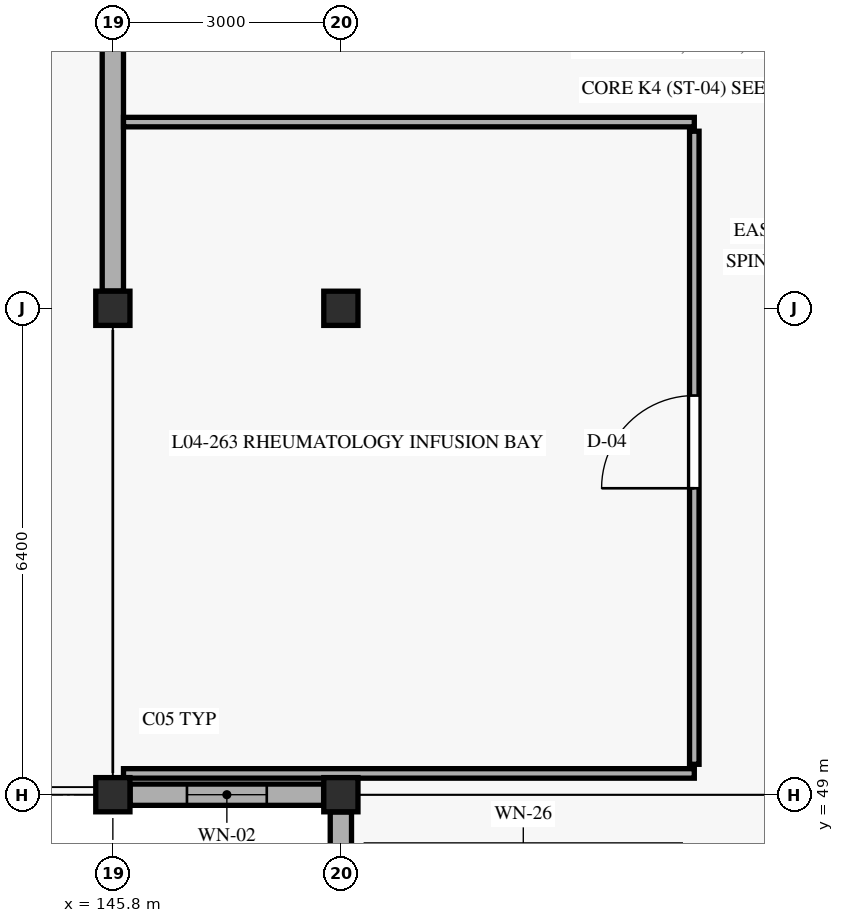
"""IFC4 building model, lengths in metres.
Left out: names, types, materials, properties, quantities, classifications, styles, units other than length and angle.
Written with IfcOpenShell. Run it as: python <this file> out.ifc"""

import sys

from ifc_helpers import new_model, si_unit, direction, frame, frame_2d, origin, origin_with_axes, origin_2d, place, context, subcontext, project, spatial, rectangle, extrude, element, fill, save


model = new_model("IFC4")
c1 = context("Model", 3, precision=1e-05, world=origin(), true_north=direction((0.0, 1.0)))
c2 = subcontext(c1, "Body", "Model", "MODEL_VIEW")
j1 = project(units=[si_unit("LENGTHUNIT", "METRE"), si_unit("PLANEANGLEUNIT", "RADIAN")], contexts=[c1])
p1 = place(None, origin())
s1 = spatial("IfcSite", under=j1, at=p1, CompositionType="ELEMENT")
p2 = place(p1, origin())
s2 = spatial("IfcBuilding", under=s1, at=p2, CompositionType="ELEMENT")
p3 = place(p2, frame((0.0, 0.0, 13.5)))
s3 = spatial("IfcBuildingStorey", under=s2, at=p3, CompositionType="ELEMENT", Elevation=13.5)
for number, where, z_axis, x_axis in (
    (1, (145.8, 49.0, 0.0), (0.0, 0.0, 1.0), (1.0, 0.0, 0.0)),
    (2, (145.8, 55.4, 0.0), (0.0, 0.0, 1.0), (1.0, 0.0, 0.0)),
    (3, (148.8, 49.0, 0.0), (0.0, 0.0, 1.0), (1.0, 0.0, 0.0)),
    (4, (148.8, 55.4, 0.0), (0.0, 0.0, 1.0), (1.0, 0.0, 0.0)),
):
    element("IfcColumn", number, at=place(p3, frame(where, z_axis=z_axis, x_axis=x_axis)), inside=s3, PredefinedType="COLUMN", context=c2, shape_type="SweptSolid", body=[
        extrude(rectangle(XDim=0.45, YDim=0.45, at=origin_2d()), origin(), (0.0, 0.0, 1.0), 4.05),
    ])
p4 = place(p3, frame((148.8, 48.773, 0.0), z_axis=(0.0, 0.0, 1.0), x_axis=(0.0, -1.0, 0.0)))
e5 = element("IfcWall", 5, at=p4, inside=s3, PredefinedType="SOLIDWALL", context=c2, shape_type="SweptSolid", body=[
    extrude(rectangle(XDim=5.946, YDim=0.28, at=frame_2d((2.973, 0.0))), origin(), (0.0, 0.0, 1.0), 3.39),
])
p5 = place(p4, frame((1.948, 0.0, 0.8)))
e6 = element("IfcOpeningElement", 6, at=p5, cuts=e5, PredefinedType="OPENING", context=c2, shape_type="SweptSolid", body=[
    extrude(rectangle(XDim=2.05, YDim=1.95, at=frame_2d((1.025, 0.975))), frame((0.0, 0.15, 0.0), z_axis=(0.0, -1.0, 0.0), x_axis=(1.0, 0.0, 0.0)), (0.0, 0.0, 1.0), 0.3),
])
p6 = place(p3, frame((145.8, 63.573, 0.0), z_axis=(0.0, 0.0, 1.0), x_axis=(0.0, -1.0, 0.0)))
e7 = element("IfcWall", 7, at=p6, inside=s3, PredefinedType="SOLIDWALL", context=c2, shape_type="SweptSolid", body=[
    extrude(rectangle(XDim=7.946, YDim=0.28, at=frame_2d((3.973, 0.0))), origin(), (0.0, 0.0, 1.0), 3.34),
])
p7 = place(p6, frame((3.403, 0.0, 0.0)))
e8 = element("IfcOpeningElement", 8, at=p7, cuts=e7, PredefinedType="OPENING", context=c2, shape_type="SweptSolid", body=[
    extrude(rectangle(XDim=1.14, YDim=2.3, at=frame_2d((0.57, 1.15))), frame((0.0, 0.15, 0.0), z_axis=(0.0, -1.0, 0.0), x_axis=(1.0, 0.0, 0.0)), (0.0, 0.0, 1.0), 0.3),
])
p8 = place(p3, frame((146.027, 49.0, 0.0), z_axis=(0.0, 0.0, 1.0), x_axis=(1.0, 0.0, 0.0)))
e9 = element("IfcWall", 9, at=p8, inside=s3, PredefinedType="SOLIDWALL", context=c2, shape_type="SweptSolid", body=[
    extrude(rectangle(XDim=2.546, YDim=0.28, at=frame_2d((1.273, 0.0))), origin(), (0.0, 0.0, 1.0), 3.41),
])
p9 = place(p8, frame((0.748, 0.0, 0.88)))
e10 = element("IfcOpeningElement", 10, at=p9, cuts=e9, PredefinedType="OPENING", context=c2, shape_type="SweptSolid", body=[
    extrude(rectangle(XDim=1.05, YDim=2.2, at=frame_2d((0.525, 1.1))), frame((0.0, 0.15, 0.0), z_axis=(0.0, -1.0, 0.0), x_axis=(1.0, 0.0, 0.0)), (0.0, 0.0, 1.0), 0.3),
])
p10 = place(p3, frame((153.45, 49.4, 0.0), z_axis=(0.0, 0.0, 1.0), x_axis=(0.0, 1.0, 0.0)))
e11 = element("IfcWall", 11, at=p10, inside=s3, PredefinedType="PARTITIONING", context=c2, shape_type="SweptSolid", body=[
    extrude(rectangle(XDim=8.33, YDim=0.125, at=frame_2d((4.165, 0.0))), origin(), (0.0, 0.0, 1.0), 3.365),
])
p11 = place(p10, frame((3.632, 0.0, 0.0)))
e12 = element("IfcOpeningElement", 12, at=p11, cuts=e11, PredefinedType="OPENING", context=c2, shape_type="SweptSolid", body=[
    extrude(rectangle(XDim=1.22, YDim=2.2, at=frame_2d((0.61, 1.1))), frame((0.0, 0.073, 0.0), z_axis=(0.0, -1.0, 0.0), x_axis=(1.0, 0.0, 0.0)), (0.0, 0.0, 1.0), 0.145),
])
for number, where, z_axis, x_axis in (
    (13, (145.94, 49.28, 0.0), (0.0, 0.0, 1.0), (1.0, 0.0, 0.0)),
    (14, (145.94, 57.85, 0.0), (0.0, 0.0, 1.0), (1.0, 0.0, 0.0)),
):
    element("IfcWall", number, at=place(p3, frame(where, z_axis=z_axis, x_axis=x_axis)), inside=s3, PredefinedType="PARTITIONING", context=c2, shape_type="SweptSolid", body=[
        extrude(rectangle(XDim=7.51, YDim=0.125, at=frame_2d((3.755, 0.0))), origin(), (0.0, 0.0, 1.0), 3.335),
    ])
p12 = place(p9, origin_with_axes())
e15 = element("IfcWindow", 15, at=p12, inside=s3, PartitioningType="SINGLE_PANEL", PredefinedType="WINDOW", context=c2, shape_type="SweptSolid", body=[
    extrude(rectangle(XDim=1.05, YDim=2.2, at=frame_2d((0.525, 1.1))), frame((0.0, 0.03, 0.0), z_axis=(0.0, -1.0, 0.0), x_axis=(1.0, 0.0, 0.0)), (0.0, 0.0, 1.0), 0.06),
])
fill(e10, e15)
p13 = place(p11, origin_with_axes())
e16 = element("IfcDoor", 16, at=p13, inside=s3, OperationType="SINGLE_SWING_LEFT", PredefinedType="DOOR", context=c2, shape_type="SweptSolid", body=[
    extrude(rectangle(XDim=1.22, YDim=2.2, at=frame_2d((0.61, 1.1))), frame((0.0, 0.025, 0.0), z_axis=(0.0, -1.0, 0.0), x_axis=(1.0, 0.0, 0.0)), (0.0, 0.0, 1.0), 0.05),
])
fill(e12, e16)
save(model, sys.argv[1])
